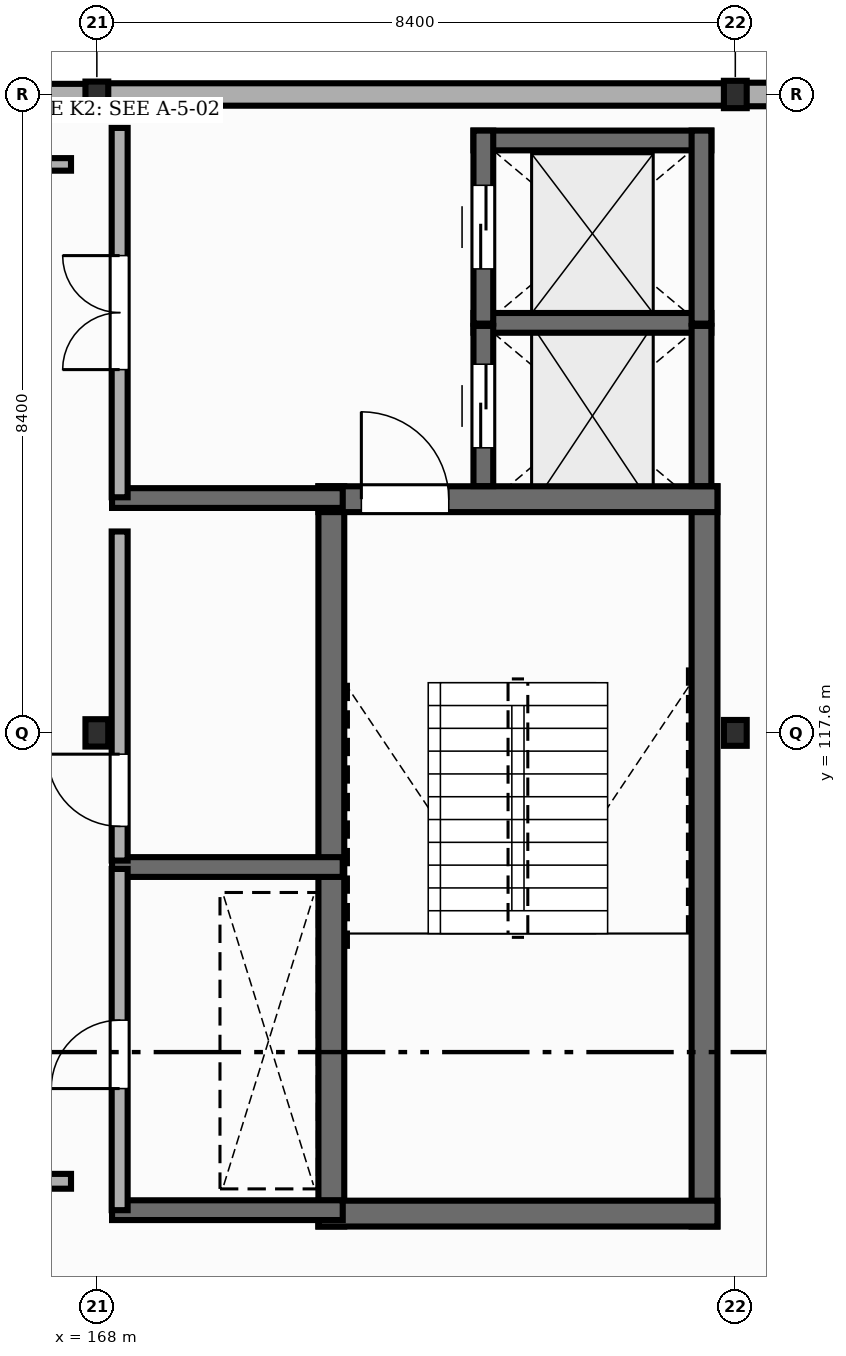
"""IFC4 building model, lengths in metres.
Left out: names, types, materials, properties, quantities, classifications, styles, units other than length and angle.
Written with IfcOpenShell. Run it as: python <this file> out.ifc"""

import sys

from ifc_helpers import new_model, si_unit, direction, frame, frame_2d, origin, origin_2d, place, context, subcontext, project, spatial, rectangle, i_section, extrude, element, fill, save


model = new_model("IFC4")
c1 = context("Model", 3, precision=1e-05, world=origin(), true_north=direction((0.0, 1.0)))
c2 = subcontext(c1, "Body", "Model", "MODEL_VIEW")
j1 = project(units=[si_unit("LENGTHUNIT", "METRE"), si_unit("PLANEANGLEUNIT", "RADIAN")], contexts=[c1])
p1 = place(None, origin())
s1 = spatial("IfcSite", under=j1, at=p1, CompositionType="ELEMENT")
p2 = place(p1, origin())
s2 = spatial("IfcBuilding", under=s1, at=p2, CompositionType="ELEMENT")
p3 = place(p2, frame((0.0, 0.0, 26.1)))
s3 = spatial("IfcBuildingStorey", under=s2, at=p3, CompositionType="ELEMENT", Elevation=26.1)
p4 = place(p3, frame((168.0, 117.6, 0.0), z_axis=(0.0, 0.0, 1.0), x_axis=(1.0, 0.0, 0.0)))
e1 = element("IfcColumn", 1, at=p4, inside=s3, PredefinedType="COLUMN", context=c2, shape_type="SweptSolid", body=[
    extrude(i_section(OverallWidth=0.3, OverallDepth=0.36, WebThickness=0.012, FlangeThickness=0.022, FilletRadius=0.027, at=origin_2d()), origin(), (0.0, 0.0, 1.0), 4.05),
])
for number, where, z_axis, x_axis in (
    (2, (168.0, 126.0, 0.0), (0.0, 0.0, 1.0), (1.0, 0.0, 0.0)),
    (3, (176.4, 117.6, 0.0), (0.0, 0.0, 1.0), (1.0, 0.0, 0.0)),
):
    element("IfcColumn", number, at=place(p3, frame(where, z_axis=z_axis, x_axis=x_axis)), inside=s3, PredefinedType="COLUMN", context=c2, shape_type="SweptSolid", body=[
        extrude(i_section(OverallWidth=0.3, OverallDepth=0.34, WebThickness=0.012, FlangeThickness=0.021, FilletRadius=0.027, at=origin_2d()), origin(), (0.0, 0.0, 1.0), 4.05),
    ])
p5 = place(p3, frame((176.4, 126.0, 0.0), z_axis=(0.0, 0.0, 1.0), x_axis=(1.0, 0.0, 0.0)))
e4 = element("IfcColumn", 4, at=p5, inside=s3, PredefinedType="COLUMN", context=c2, shape_type="SweptSolid", body=[
    extrude(i_section(OverallWidth=0.3, OverallDepth=0.36, WebThickness=0.012, FlangeThickness=0.022, FilletRadius=0.027, at=origin_2d()), origin(), (0.0, 0.0, 1.0), 4.05),
])
p6 = place(p3, frame((184.792, 126.0, 0.0), z_axis=(0.0, 0.0, 1.0), x_axis=(-1.0, 0.0, 0.0)))
e5 = element("IfcWall", 5, at=p6, inside=s3, PredefinedType="STANDARD", context=c2, shape_type="SweptSolid", body=[
    extrude(rectangle(XDim=8.384, YDim=0.31, at=frame_2d((4.192, 0.0))), origin(), (0.0, 0.0, 1.0), 3.497),
])
p7 = place(p3, frame((176.392, 126.0, 0.0), z_axis=(0.0, 0.0, 1.0), x_axis=(-1.0, 0.0, 0.0)))
e6 = element("IfcWall", 6, at=p7, inside=s3, PredefinedType="STANDARD", context=c2, shape_type="SweptSolid", body=[
    extrude(rectangle(XDim=8.384, YDim=0.295, at=frame_2d((4.192, 0.0))), origin(), (0.0, 0.0, 1.0), 3.527),
])
p8 = place(p3, frame((167.992, 126.0, 0.0), z_axis=(0.0, 0.0, 1.0), x_axis=(-1.0, 0.0, 0.0)))
e7 = element("IfcWall", 7, at=p8, inside=s3, PredefinedType="STANDARD", context=c2, shape_type="SweptSolid", body=[
    extrude(rectangle(XDim=8.384, YDim=0.28, at=frame_2d((4.192, 0.0))), origin(), (0.0, 0.0, 1.0), 3.497),
])
for number, where, z_axis, x_axis in (
    (8, (171.085, 111.105, 0.0), (0.0, 0.0, 1.0), (0.0, 1.0, 0.0)),
    (9, (175.995, 111.105, 0.0), (0.0, 0.0, 1.0), (0.0, 1.0, 0.0)),
):
    element("IfcWall", number, at=place(p3, frame(where, z_axis=z_axis, x_axis=x_axis)), inside=s3, PredefinedType="SHEAR", context=c2, shape_type="SweptSolid", body=[
        extrude(rectangle(XDim=9.74, YDim=0.34, at=frame_2d((4.87, 0.0))), origin(), (0.0, 0.0, 1.0), 3.85),
    ])
p9 = place(p3, frame((170.915, 111.275, 0.0), z_axis=(0.0, 0.0, 1.0), x_axis=(1.0, 0.0, 0.0)))
e10 = element("IfcWall", 10, at=p9, inside=s3, PredefinedType="SHEAR", context=c2, shape_type="SweptSolid", body=[
    extrude(rectangle(XDim=5.25, YDim=0.34, at=frame_2d((2.625, 0.0))), origin(), (0.0, 0.0, 1.0), 3.85),
])
p10 = place(p3, frame((170.915, 120.675, 0.0), z_axis=(0.0, 0.0, 1.0), x_axis=(1.0, 0.0, 0.0)))
e11 = element("IfcWall", 11, at=p10, inside=s3, PredefinedType="SHEAR", context=c2, shape_type="SweptSolid", body=[
    extrude(rectangle(XDim=5.25, YDim=0.34, at=frame_2d((2.625, 0.0))), origin(), (0.0, 0.0, 1.0), 3.85),
])
p11 = place(p10, frame((0.565, 0.0, 0.0)))
e12 = element("IfcOpeningElement", 12, at=p11, cuts=e11, PredefinedType="OPENING", context=c2, shape_type="SweptSolid", body=[
    extrude(rectangle(XDim=1.15, YDim=2.15, at=frame_2d((0.575, 1.075))), frame((0.0, 0.18, 0.0), z_axis=(0.0, -1.0, 0.0), x_axis=(1.0, 0.0, 0.0)), (0.0, 0.0, 1.0), 0.36),
])
p12 = place(p3, frame((172.955, 122.995, 0.0), z_axis=(0.0, 0.0, 1.0), x_axis=(1.0, 0.0, 0.0)))
e13 = element("IfcWall", 13, at=p12, inside=s3, PredefinedType="SHEAR", context=c2, shape_type="SweptSolid", body=[
    extrude(rectangle(XDim=3.13, YDim=0.26, at=frame_2d((1.565, 0.0))), origin(), (0.0, 0.0, 1.0), 3.85),
])
p13 = place(p3, frame((175.955, 120.847, 0.0), z_axis=(0.0, 0.0, 1.0), x_axis=(0.0, 1.0, 0.0)))
e14 = element("IfcWall", 14, at=p13, inside=s3, PredefinedType="SHEAR", context=c2, shape_type="SweptSolid", body=[
    extrude(rectangle(XDim=2.108, YDim=0.26, at=frame_2d((1.054, 0.0))), origin(), (0.0, 0.0, 1.0), 3.85),
])
p14 = place(p3, frame((173.085, 120.847, 0.0), z_axis=(0.0, 0.0, 1.0), x_axis=(0.0, 1.0, 0.0)))
e15 = element("IfcWall", 15, at=p14, inside=s3, PredefinedType="SHEAR", context=c2, shape_type="SweptSolid", body=[
    extrude(rectangle(XDim=2.108, YDim=0.26, at=frame_2d((1.054, 0.0))), origin(), (0.0, 0.0, 1.0), 3.85),
])
p15 = place(p14, frame((0.504, 0.0, 0.0)))
e16 = element("IfcOpeningElement", 16, at=p15, cuts=e15, PredefinedType="OPENING", context=c2, shape_type="SweptSolid", body=[
    extrude(rectangle(XDim=1.1, YDim=2.15, at=frame_2d((0.55, 1.075))), frame((0.0, 0.14, 0.0), z_axis=(0.0, -1.0, 0.0), x_axis=(1.0, 0.0, 0.0)), (0.0, 0.0, 1.0), 0.28),
])
p16 = place(p3, frame((172.955, 125.395, 0.0), z_axis=(0.0, 0.0, 1.0), x_axis=(1.0, 0.0, 0.0)))
e17 = element("IfcWall", 17, at=p16, inside=s3, PredefinedType="SHEAR", context=c2, shape_type="SweptSolid", body=[
    extrude(rectangle(XDim=3.13, YDim=0.26, at=frame_2d((1.565, 0.0))), origin(), (0.0, 0.0, 1.0), 3.85),
])
p17 = place(p3, frame((175.955, 122.985, 0.0), z_axis=(0.0, 0.0, 1.0), x_axis=(0.0, 1.0, 0.0)))
e18 = element("IfcWall", 18, at=p17, inside=s3, PredefinedType="SHEAR", context=c2, shape_type="SweptSolid", body=[
    extrude(rectangle(XDim=2.54, YDim=0.26, at=frame_2d((1.27, 0.0))), origin(), (0.0, 0.0, 1.0), 3.85),
])
p18 = place(p3, frame((173.085, 122.985, 0.0), z_axis=(0.0, 0.0, 1.0), x_axis=(0.0, 1.0, 0.0)))
e19 = element("IfcWall", 19, at=p18, inside=s3, PredefinedType="SHEAR", context=c2, shape_type="SweptSolid", body=[
    extrude(rectangle(XDim=2.54, YDim=0.26, at=frame_2d((1.27, 0.0))), origin(), (0.0, 0.0, 1.0), 3.85),
])
p19 = place(p18, frame((0.72, 0.0, 0.0)))
e20 = element("IfcOpeningElement", 20, at=p19, cuts=e19, PredefinedType="OPENING", context=c2, shape_type="SweptSolid", body=[
    extrude(rectangle(XDim=1.1, YDim=2.15, at=frame_2d((0.55, 1.075))), frame((0.0, 0.14, 0.0), z_axis=(0.0, -1.0, 0.0), x_axis=(1.0, 0.0, 0.0)), (0.0, 0.0, 1.0), 0.28),
])
for number, where, z_axis, x_axis in (
    (21, (168.2, 111.32, 0.0), (0.0, 0.0, 1.0), (1.0, 0.0, 0.0)),
    (22, (168.2, 115.835, 0.0), (0.0, 0.0, 1.0), (1.0, 0.0, 0.0)),
    (23, (168.2, 120.69, 0.0), (0.0, 0.0, 1.0), (1.0, 0.0, 0.0)),
):
    element("IfcWall", number, at=place(p3, frame(where, z_axis=z_axis, x_axis=x_axis)), inside=s3, PredefinedType="SHEAR", context=c2, shape_type="SweptSolid", body=[
        extrude(rectangle(XDim=3.035, YDim=0.26, at=frame_2d((1.518, 0.0))), origin(), (0.0, 0.0, 1.0), 3.85),
    ])
p20 = place(p3, frame((168.3, 111.32, 0.0), z_axis=(0.0, 0.0, 1.0), x_axis=(0.0, 1.0, 0.0)))
e24 = element("IfcWall", 24, at=p20, inside=s3, PredefinedType="STANDARD", context=c2, shape_type="SweptSolid", body=[
    extrude(rectangle(XDim=4.49, YDim=0.21, at=frame_2d((2.245, 0.0))), origin(), (0.0, 0.0, 1.0), 3.367),
])
p21 = place(p20, frame((1.6, 0.0, 0.0)))
e25 = element("IfcOpeningElement", 25, at=p21, cuts=e24, PredefinedType="OPENING", context=c2, shape_type="SweptSolid", body=[
    extrude(rectangle(XDim=0.9, YDim=2.1, at=frame_2d((0.45, 1.05))), frame((0.0, 0.115, 0.0), z_axis=(0.0, -1.0, 0.0), x_axis=(1.0, 0.0, 0.0)), (0.0, 0.0, 1.0), 0.23),
])
p22 = place(p3, frame((168.3, 115.92, 0.0), z_axis=(0.0, 0.0, 1.0), x_axis=(0.0, 1.0, 0.0)))
e26 = element("IfcWall", 26, at=p22, inside=s3, PredefinedType="STANDARD", context=c2, shape_type="SweptSolid", body=[
    extrude(rectangle(XDim=4.33, YDim=0.21, at=frame_2d((2.165, 0.0))), origin(), (0.0, 0.0, 1.0), 3.367),
])
p23 = place(p22, frame((0.45, 0.0, 0.0)))
e27 = element("IfcOpeningElement", 27, at=p23, cuts=e26, PredefinedType="OPENING", context=c2, shape_type="SweptSolid", body=[
    extrude(rectangle(XDim=0.95, YDim=2.15, at=frame_2d((0.475, 1.075))), frame((0.0, 0.115, 0.0), z_axis=(0.0, -1.0, 0.0), x_axis=(1.0, 0.0, 0.0)), (0.0, 0.0, 1.0), 0.23),
])
p24 = place(p3, frame((168.3, 120.7, 0.0), z_axis=(0.0, 0.0, 1.0), x_axis=(0.0, 1.0, 0.0)))
e28 = element("IfcWall", 28, at=p24, inside=s3, PredefinedType="STANDARD", context=c2, shape_type="SweptSolid", body=[
    extrude(rectangle(XDim=4.86, YDim=0.21, at=frame_2d((2.43, 0.0))), origin(), (0.0, 0.0, 1.0), 3.457),
])
p25 = place(p24, frame((1.68, 0.0, 0.0)))
e29 = element("IfcOpeningElement", 29, at=p25, cuts=e28, PredefinedType="OPENING", context=c2, shape_type="SweptSolid", body=[
    extrude(rectangle(XDim=1.5, YDim=2.2, at=frame_2d((0.75, 1.1))), frame((0.0, 0.115, 0.0), z_axis=(0.0, -1.0, 0.0), x_axis=(1.0, 0.0, 0.0)), (0.0, 0.0, 1.0), 0.23),
])
p26 = place(p3, frame((165.1, 111.7, -0.004), z_axis=(0.0, 0.0, 1.0), x_axis=(1.0, 0.0, 0.0)))
e30 = element("IfcWall", 30, at=p26, inside=s3, PredefinedType="STANDARD", context=c2, shape_type="SweptSolid", body=[
    extrude(rectangle(XDim=2.56, YDim=0.195, at=frame_2d((1.28, 0.0))), origin(), (0.0, 0.0, 1.0), 3.854),
])
p27 = place(p3, frame((167.66, 125.08, -0.004), z_axis=(0.0, 0.0, 1.0), x_axis=(-1.0, 0.0, 0.0)))
e31 = element("IfcWall", 31, at=p27, inside=s3, PredefinedType="STANDARD", context=c2, shape_type="SweptSolid", body=[
    extrude(rectangle(XDim=2.56, YDim=0.165, at=frame_2d((1.28, 0.0))), origin(), (0.0, 0.0, 1.0), 3.854),
])
p28 = place(p11, origin())
e32 = element("IfcDoor", 32, at=p28, inside=s3, OperationType="SINGLE_SWING_LEFT", PredefinedType="DOOR", context=c2, shape_type="SweptSolid", body=[
    extrude(rectangle(XDim=1.15, YDim=2.15, at=frame_2d((0.575, 1.075))), frame((0.0, 0.025, 0.0), z_axis=(0.0, -1.0, 0.0), x_axis=(1.0, 0.0, 0.0)), (0.0, 0.0, 1.0), 0.05),
])
fill(e12, e32)
p29 = place(p15, origin())
e33 = element("IfcDoor", 33, at=p29, inside=s3, OperationType="DOUBLE_DOOR_SLIDING", PredefinedType="DOOR", context=c2, shape_type="SweptSolid", body=[
    extrude(rectangle(XDim=1.1, YDim=2.15, at=frame_2d((0.55, 1.075))), frame((0.0, 0.025, 0.0), z_axis=(0.0, -1.0, 0.0), x_axis=(1.0, 0.0, 0.0)), (0.0, 0.0, 1.0), 0.05),
])
fill(e16, e33)
p30 = place(p19, origin())
e34 = element("IfcDoor", 34, at=p30, inside=s3, OperationType="DOUBLE_DOOR_SLIDING", PredefinedType="DOOR", context=c2, shape_type="SweptSolid", body=[
    extrude(rectangle(XDim=1.1, YDim=2.15, at=frame_2d((0.55, 1.075))), frame((0.0, 0.025, 0.0), z_axis=(0.0, -1.0, 0.0), x_axis=(1.0, 0.0, 0.0)), (0.0, 0.0, 1.0), 0.05),
])
fill(e20, e34)
p31 = place(p21, origin())
e35 = element("IfcDoor", 35, at=p31, inside=s3, OperationType="SINGLE_SWING_LEFT", PredefinedType="DOOR", context=c2, shape_type="SweptSolid", body=[
    extrude(rectangle(XDim=0.9, YDim=2.1, at=frame_2d((0.45, 1.05))), frame((0.0, 0.025, 0.0), z_axis=(0.0, -1.0, 0.0), x_axis=(1.0, 0.0, 0.0)), (0.0, 0.0, 1.0), 0.05),
])
fill(e25, e35)
p32 = place(p23, origin())
e36 = element("IfcDoor", 36, at=p32, inside=s3, OperationType="SINGLE_SWING_RIGHT", PredefinedType="DOOR", context=c2, shape_type="SweptSolid", body=[
    extrude(rectangle(XDim=0.95, YDim=2.15, at=frame_2d((0.475, 1.075))), frame((0.0, 0.025, 0.0), z_axis=(0.0, -1.0, 0.0), x_axis=(1.0, 0.0, 0.0)), (0.0, 0.0, 1.0), 0.05),
])
fill(e27, e36)
p33 = place(p25, origin())
e37 = element("IfcDoor", 37, at=p33, inside=s3, OperationType="DOUBLE_DOOR_SINGLE_SWING", PredefinedType="DOOR", context=c2, shape_type="SweptSolid", body=[
    extrude(rectangle(XDim=1.5, YDim=2.2, at=frame_2d((0.75, 1.1))), frame((0.0, 0.025, 0.0), z_axis=(0.0, -1.0, 0.0), x_axis=(1.0, 0.0, 0.0)), (0.0, 0.0, 1.0), 0.05),
])
fill(e29, e37)
save(model, sys.argv[1])
